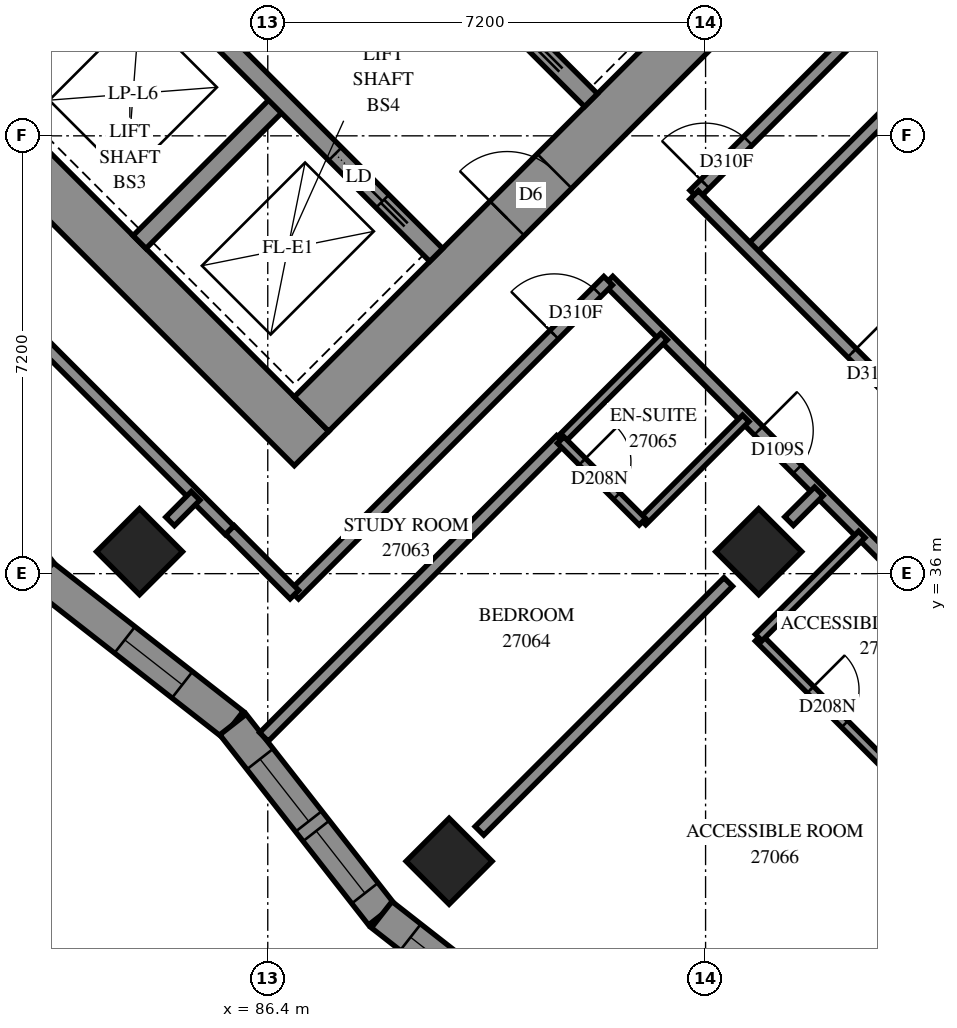
"""IFC4 building model, lengths in metres.
Left out: names, types, materials, properties, quantities, classifications, styles, units other than length and angle.
Written with IfcOpenShell. Run it as: python <this file> out.ifc"""

import sys

from ifc_helpers import new_model, si_unit, direction, frame, frame_2d, origin, origin_2d, place, context, subcontext, project, spatial, polyline, rectangle, outline, extrude, element, fill, save


model = new_model("IFC4")
c1 = context("Model", 3, precision=1e-05, world=origin(), true_north=direction((0.0, 1.0)))
c2 = subcontext(c1, "Body", "Model", "MODEL_VIEW")
j1 = project(units=[si_unit("LENGTHUNIT", "METRE"), si_unit("PLANEANGLEUNIT", "RADIAN")], contexts=[c1])
p1 = place(None, origin())
s1 = spatial("IfcSite", under=j1, at=p1, CompositionType="ELEMENT")
p2 = place(p1, origin())
s2 = spatial("IfcBuilding", under=s1, at=p2, CompositionType="ELEMENT")
p3 = place(p2, frame((0.0, 0.0, 101.6)))
s3 = spatial("IfcBuildingStorey", under=s2, at=p3, CompositionType="ELEMENT", Elevation=101.6)
for number, where, z_axis, x_axis in (
    (1, (84.291, 36.362, 0.0), (0.0, 0.0, 1.0), (0.707, -0.707, 0.0)),
    (2, (94.474, 36.362, 0.0), (0.0, 0.0, 1.0), (0.707, -0.707, 0.0)),
    (3, (89.382, 31.271, 0.0), (0.0, 0.0, 1.0), (0.707, -0.707, 0.0)),
):
    element("IfcColumn", number, at=place(p3, frame(where, z_axis=z_axis, x_axis=x_axis)), inside=s3, PredefinedType="COLUMN", context=c2, shape_type="SweptSolid", body=[
        extrude(rectangle(XDim=1.0, YDim=1.0, at=origin_2d()), origin(), (0.0, 0.0, 1.0), 3.1),
    ])
p4 = place(p3, frame((75.806, 49.373, -0.3), z_axis=(0.0, 0.0, 1.0), x_axis=(0.7071067812, -0.7071067812, 0.0)))
e4 = element("IfcWall", 4, at=p4, inside=s3, PredefinedType="SHEAR", context=c2, shape_type="SweptSolid", body=[
    extrude(rectangle(XDim=16.0, YDim=0.8, at=frame_2d((8.0, 0.0))), origin(), (0.0, 0.0, 1.0), 2.7),
])
p5 = place(p3, frame((87.12, 38.625, -0.3), z_axis=(0.0, 0.0, 1.0), x_axis=(0.7071067812, 0.7071067812, 0.0)))
e5 = element("IfcWall", 5, at=p5, inside=s3, PredefinedType="SHEAR", context=c2, shape_type="SweptSolid", body=[
    extrude(rectangle(XDim=14.4, YDim=0.8, at=frame_2d((7.2, 0.0))), origin(), (0.0, 0.0, 1.0), 2.7),
])
p6 = place(p5, frame((4.55, 0.0, 0.3)))
e6 = element("IfcOpeningElement", 6, at=p6, cuts=e5, PredefinedType="OPENING", context=c2, shape_type="SweptSolid", body=[
    extrude(rectangle(XDim=1.1, YDim=2.1, at=frame_2d((0.55, 1.05))), frame((0.0, 0.41, 0.0), z_axis=(0.0, -1.0, 0.0), x_axis=(1.0, 0.0, 0.0)), (0.0, 0.0, 1.0), 0.82),
])
p7 = place(p5, frame((11.35, 0.0, 0.3)))
e7 = element("IfcOpeningElement", 7, at=p7, cuts=e5, PredefinedType="OPENING", context=c2, shape_type="SweptSolid", body=[
    extrude(rectangle(XDim=1.1, YDim=2.1, at=frame_2d((0.55, 1.05))), frame((0.0, 0.41, 0.0), z_axis=(0.0, -1.0, 0.0), x_axis=(1.0, 0.0, 0.0)), (0.0, 0.0, 1.0), 0.82),
])
for number, where, z_axis, x_axis in (
    (8, (81.746, 43.999, 0.0), (0.0, 0.0, 1.0), (0.707, 0.707, 0.0)),
    (9, (84.291, 41.453, 0.0), (0.0, 0.0, 1.0), (0.707, 0.707, 0.0)),
):
    element("IfcWall", number, at=place(p3, frame(where, z_axis=z_axis, x_axis=x_axis)), inside=s3, PredefinedType="SOLIDWALL", context=c2, shape_type="SweptSolid", body=[
        extrude(rectangle(XDim=3.3, YDim=0.3, at=frame_2d((1.65, 0.0))), origin(), (0.0, 0.0, 1.0), 3.1),
    ])
p8 = place(p3, frame((78.988, 51.423, 0.0), z_axis=(0.0, 0.0, 1.0), x_axis=(0.7071067812, -0.7071067812, 0.0)))
e10 = element("IfcWall", 10, at=p8, inside=s3, PredefinedType="SOLIDWALL", context=c2, shape_type="SweptSolid", body=[
    extrude(rectangle(XDim=14.4, YDim=0.3, at=frame_2d((7.2, 0.0))), origin(), (0.0, 0.0, 1.0), 3.1),
])
p9 = place(p8, frame((1.25, 0.0, 0.0)))
e11 = element("IfcOpeningElement", 11, at=p9, cuts=e10, PredefinedType="OPENING", context=c2, shape_type="SweptSolid", body=[
    extrude(rectangle(XDim=1.1, YDim=2.1, at=frame_2d((0.55, 1.05))), frame((0.0, 0.16, 0.0), z_axis=(0.0, -1.0, 0.0), x_axis=(1.0, 0.0, 0.0)), (0.0, 0.0, 1.0), 0.32),
])
p10 = place(p8, frame((4.85, 0.0, 0.0)))
e12 = element("IfcOpeningElement", 12, at=p10, cuts=e10, PredefinedType="OPENING", context=c2, shape_type="SweptSolid", body=[
    extrude(rectangle(XDim=1.1, YDim=2.1, at=frame_2d((0.55, 1.05))), frame((0.0, 0.16, 0.0), z_axis=(0.0, -1.0, 0.0), x_axis=(1.0, 0.0, 0.0)), (0.0, 0.0, 1.0), 0.32),
])
p11 = place(p8, frame((8.45, 0.0, 0.0)))
e13 = element("IfcOpeningElement", 13, at=p11, cuts=e10, PredefinedType="OPENING", context=c2, shape_type="SweptSolid", body=[
    extrude(rectangle(XDim=1.1, YDim=2.1, at=frame_2d((0.55, 1.05))), frame((0.0, 0.16, 0.0), z_axis=(0.0, -1.0, 0.0), x_axis=(1.0, 0.0, 0.0)), (0.0, 0.0, 1.0), 0.32),
])
p12 = place(p8, frame((12.05, 0.0, 0.0)))
e14 = element("IfcOpeningElement", 14, at=p12, cuts=e10, PredefinedType="OPENING", context=c2, shape_type="SweptSolid", body=[
    extrude(rectangle(XDim=1.1, YDim=2.1, at=frame_2d((0.55, 1.05))), frame((0.0, 0.16, 0.0), z_axis=(0.0, -1.0, 0.0), x_axis=(1.0, 0.0, 0.0)), (0.0, 0.0, 1.0), 0.32),
])
p13 = place(p3, frame((81.534, 53.969, 0.0), z_axis=(0.0, 0.0, 1.0), x_axis=(0.707103309, -0.7071102534, 0.0)))
e15 = element("IfcWall", 15, at=p13, inside=s3, PredefinedType="SOLIDWALL", context=c2, shape_type="SweptSolid", body=[
    extrude(rectangle(XDim=14.4, YDim=0.3, at=frame_2d((7.2, 0.0))), origin(), (0.0, 0.0, 1.0), 3.1),
])
p14 = place(p13, frame((12.05, 0.0, 0.0)))
e16 = element("IfcOpeningElement", 16, at=p14, cuts=e15, PredefinedType="OPENING", context=c2, shape_type="SweptSolid", body=[
    extrude(rectangle(XDim=1.1, YDim=2.1, at=frame_2d((0.55, 1.05))), frame((0.0, 0.16, 0.0), z_axis=(0.0, -1.0, 0.0), x_axis=(1.0, 0.0, 0.0)), (0.0, 0.0, 1.0), 0.32),
])
p15 = place(p3, frame((80.243, 39.109, 0.0), z_axis=(0.0, 0.0, 1.0), x_axis=(0.6160271492, -0.7877249212, 0.0)))
e17 = element("IfcWall", 17, at=p15, inside=s3, PredefinedType="SOLIDWALL", context=c2, shape_type="SweptSolid", body=[
    extrude(outline(polyline([(0.054, -0.275), (4.024, -0.275), (3.957, 0.275), (-0.054, 0.275), (0.054, -0.275)])), origin(), (0.0, 0.0, 1.0), 3.1),
])
p16 = place(p15, frame((1.886, 0.0, 0.5)))
e18 = element("IfcOpeningElement", 18, at=p16, cuts=e17, PredefinedType="OPENING", context=c2, shape_type="SweptSolid", body=[
    extrude(rectangle(XDim=1.2, YDim=2.45, at=frame_2d((0.6, 1.225))), frame((0.0, 0.285, 0.0), z_axis=(0.0, -1.0, 0.0), x_axis=(1.0, 0.0, 0.0)), (0.0, 0.0, 1.0), 0.57),
])
p17 = place(p3, frame((82.701, 35.965, 0.0), z_axis=(0.0, 0.0, 1.0), x_axis=(0.7877313819, -0.6160188877, 0.0)))
e19 = element("IfcWall", 19, at=p17, inside=s3, PredefinedType="SOLIDWALL", context=c2, shape_type="SweptSolid", body=[
    extrude(outline(polyline([(-0.034, -0.275), (3.936, -0.275), (4.004, 0.275), (0.034, 0.275), (-0.034, -0.275)])), origin(), (0.0, 0.0, 1.0), 3.1),
])
p18 = place(p17, frame((1.71, 0.0, 0.5)))
e20 = element("IfcOpeningElement", 20, at=p18, cuts=e19, PredefinedType="OPENING", context=c2, shape_type="SweptSolid", body=[
    extrude(rectangle(XDim=1.2, YDim=2.45, at=frame_2d((0.6, 1.225))), frame((0.0, 0.285, 0.0), z_axis=(0.0, -1.0, 0.0), x_axis=(1.0, 0.0, 0.0)), (0.0, 0.0, 1.0), 0.57),
])
p19 = place(p3, frame((85.828, 33.52, 0.0), z_axis=(0.0, 0.0, 1.0), x_axis=(0.6160188877, -0.7877313819, 0.0)))
e21 = element("IfcWall", 21, at=p19, inside=s3, PredefinedType="SOLIDWALL", context=c2, shape_type="SweptSolid", body=[
    extrude(outline(polyline([(0.034, -0.275), (4.004, -0.275), (3.936, 0.275), (-0.034, 0.275), (0.034, -0.275)])), origin(), (0.0, 0.0, 1.0), 3.1),
])
p20 = place(p19, frame((0.722, 0.0, 0.5)))
e22 = element("IfcOpeningElement", 22, at=p20, cuts=e21, PredefinedType="OPENING", context=c2, shape_type="SweptSolid", body=[
    extrude(rectangle(XDim=1.3, YDim=2.45, at=frame_2d((0.65, 1.225))), frame((0.0, 0.285, 0.0), z_axis=(0.0, -1.0, 0.0), x_axis=(1.0, 0.0, 0.0)), (0.0, 0.0, 1.0), 0.57),
])
p21 = place(p19, frame((2.222, 0.0, 0.5)))
e23 = element("IfcOpeningElement", 23, at=p21, cuts=e21, PredefinedType="OPENING", context=c2, shape_type="SweptSolid", body=[
    extrude(rectangle(XDim=1.3, YDim=2.45, at=frame_2d((0.65, 1.225))), frame((0.0, 0.285, 0.0), z_axis=(0.0, -1.0, 0.0), x_axis=(1.0, 0.0, 0.0)), (0.0, 0.0, 1.0), 0.57),
])
p22 = place(p3, frame((88.274, 30.392, 0.0), z_axis=(0.0, 0.0, 1.0), x_axis=(0.7877191588, -0.6160345176, 0.0)))
e24 = element("IfcWall", 24, at=p22, inside=s3, PredefinedType="SOLIDWALL", context=c2, shape_type="SweptSolid", body=[
    extrude(outline(polyline([(-0.034, -0.275), (3.936, -0.275), (4.004, 0.275), (0.034, 0.275), (-0.034, -0.275)])), origin(), (0.0, 0.0, 1.0), 3.1),
])
p23 = place(p22, frame((0.602, 0.0, 0.5)))
e25 = element("IfcOpeningElement", 25, at=p23, cuts=e24, PredefinedType="OPENING", context=c2, shape_type="SweptSolid", body=[
    extrude(rectangle(XDim=1.3, YDim=2.45, at=frame_2d((0.65, 1.225))), frame((0.0, 0.285, 0.0), z_axis=(0.0, -1.0, 0.0), x_axis=(1.0, 0.0, 0.0)), (0.0, 0.0, 1.0), 0.57),
])
p24 = place(p22, frame((2.102, 0.0, 0.5)))
e26 = element("IfcOpeningElement", 26, at=p24, cuts=e24, PredefinedType="OPENING", context=c2, shape_type="SweptSolid", body=[
    extrude(rectangle(XDim=1.3, YDim=2.45, at=frame_2d((0.65, 1.225))), frame((0.0, 0.285, 0.0), z_axis=(0.0, -1.0, 0.0), x_axis=(1.0, 0.0, 0.0)), (0.0, 0.0, 1.0), 0.57),
])
p25 = place(p3, frame((92.004, 40.819, 0.0), z_axis=(0.0, 0.0, 1.0), x_axis=(0.7071067812, -0.7071067812, 0.0)))
e27 = element("IfcWall", 27, at=p25, inside=s3, PredefinedType="PARTITIONING", context=c2, shape_type="SweptSolid", body=[
    extrude(rectangle(XDim=19.298, YDim=0.2, at=frame_2d((9.649, 0.0))), origin(), (0.0, 0.0, 1.0), 3.1),
])
p26 = place(p25, frame((3.489, 0.0, 0.0)))
e28 = element("IfcOpeningElement", 28, at=p26, cuts=e27, PredefinedType="OPENING", context=c2, shape_type="SweptSolid", body=[
    extrude(rectangle(XDim=0.9, YDim=2.1, at=frame_2d((0.45, 1.05))), frame((0.0, 0.11, 0.0), z_axis=(0.0, -1.0, 0.0), x_axis=(1.0, 0.0, 0.0)), (0.0, 0.0, 1.0), 0.22),
])
p27 = place(p25, frame((9.319, 0.0, 0.0)))
e29 = element("IfcOpeningElement", 29, at=p27, cuts=e27, PredefinedType="OPENING", context=c2, shape_type="SweptSolid", body=[
    extrude(rectangle(XDim=0.9, YDim=2.1, at=frame_2d((0.45, 1.05))), frame((0.0, 0.11, 0.0), z_axis=(0.0, -1.0, 0.0), x_axis=(1.0, 0.0, 0.0)), (0.0, 0.0, 1.0), 0.22),
])
p28 = place(p25, frame((15.961, 0.0, 0.0)))
e30 = element("IfcOpeningElement", 30, at=p28, cuts=e27, PredefinedType="OPENING", context=c2, shape_type="SweptSolid", body=[
    extrude(rectangle(XDim=0.9, YDim=2.1, at=frame_2d((0.45, 1.05))), frame((0.0, 0.11, 0.0), z_axis=(0.0, -1.0, 0.0), x_axis=(1.0, 0.0, 0.0)), (0.0, 0.0, 1.0), 0.22),
])
p29 = place(p3, frame((94.331, 41.313, 0.0), z_axis=(0.0, 0.0, 1.0), x_axis=(0.7071109413, 0.7071026211, 0.0)))
e31 = element("IfcWall", 31, at=p29, inside=s3, PredefinedType="PARTITIONING", context=c2, shape_type="SweptSolid", body=[
    extrude(rectangle(XDim=12.019, YDim=0.2, at=frame_2d((6.01, 0.0))), origin(), (0.0, 0.0, 1.0), 3.1),
])
p30 = place(p3, frame((93.413, 42.233, 0.0), z_axis=(0.0, 0.0, 1.0), x_axis=(0.7071067812, 0.7071067812, 0.0)))
e32 = element("IfcWall", 32, at=p30, inside=s3, PredefinedType="PARTITIONING", context=c2, shape_type="SweptSolid", body=[
    extrude(rectangle(XDim=9.699, YDim=0.2, at=frame_2d((4.849, 0.0))), origin(), (0.0, 0.0, 1.0), 3.1),
])
p31 = place(p30, frame((0.249, 0.0, 0.0)))
e33 = element("IfcOpeningElement", 33, at=p31, cuts=e32, PredefinedType="OPENING", context=c2, shape_type="SweptSolid", body=[
    extrude(rectangle(XDim=1.0, YDim=2.1, at=frame_2d((0.5, 1.05))), frame((0.0, 0.11, 0.0), z_axis=(0.0, -1.0, 0.0), x_axis=(1.0, 0.0, 0.0)), (0.0, 0.0, 1.0), 0.22),
])
p32 = place(p3, frame((93.411, 42.227, 0.0), z_axis=(0.0, 0.0, 1.0), x_axis=(0.7071067812, -0.7071067812, 0.0)))
e34 = element("IfcWall", 34, at=p32, inside=s3, PredefinedType="PARTITIONING", context=c2, shape_type="SweptSolid", body=[
    extrude(rectangle(XDim=8.499, YDim=0.2, at=frame_2d((4.25, 0.0))), origin(), (0.0, 0.0, 1.0), 3.1),
])
p33 = place(p32, frame((3.672, 0.0, 0.0)))
e35 = element("IfcOpeningElement", 35, at=p33, cuts=e34, PredefinedType="OPENING", context=c2, shape_type="SweptSolid", body=[
    extrude(rectangle(XDim=1.0, YDim=2.1, at=frame_2d((0.5, 1.05))), frame((0.0, 0.11, 0.0), z_axis=(0.0, -1.0, 0.0), x_axis=(1.0, 0.0, 0.0)), (0.0, 0.0, 1.0), 0.22),
])
p34 = place(p3, frame((86.835, 35.655, 0.0), z_axis=(0.0, 0.0, 1.0), x_axis=(0.7071067812, 0.7071067812, 0.0)))
e36 = element("IfcWall", 36, at=p34, inside=s3, PredefinedType="PARTITIONING", context=c2, shape_type="SweptSolid", body=[
    extrude(rectangle(XDim=7.3, YDim=0.2, at=frame_2d((3.65, 0.0))), origin(), (0.0, 0.0, 1.0), 3.1),
])
p35 = place(p34, frame((6.046, 0.0, 0.0)))
e37 = element("IfcOpeningElement", 37, at=p35, cuts=e36, PredefinedType="OPENING", context=c2, shape_type="SweptSolid", body=[
    extrude(rectangle(XDim=1.0, YDim=2.1, at=frame_2d((0.5, 1.05))), frame((0.0, 0.11, 0.0), z_axis=(0.0, -1.0, 0.0), x_axis=(1.0, 0.0, 0.0)), (0.0, 0.0, 1.0), 0.22),
])
p36 = place(p3, frame((86.337, 33.315, 0.0), z_axis=(0.0, 0.0, 1.0), x_axis=(0.7069692223, 0.7072443133, 0.0)))
e38 = element("IfcWall", 38, at=p36, inside=s3, PredefinedType="PARTITIONING", context=c2, shape_type="SweptSolid", body=[
    extrude(rectangle(XDim=6.907, YDim=0.2, at=frame_2d((3.453, 0.0))), origin(), (0.0, 0.0, 1.0), 3.1),
])
p37 = place(p3, frame((80.948, 41.536, 0.0), z_axis=(0.0, 0.0, 1.0), x_axis=(0.7071067812, -0.7071067812, 0.0)))
e39 = element("IfcWall", 39, at=p37, inside=s3, PredefinedType="PARTITIONING", context=c2, shape_type="SweptSolid", body=[
    extrude(rectangle(XDim=6.822, YDim=0.2, at=frame_2d((3.411, 0.0))), origin(), (0.0, 0.0, 1.0), 3.1),
])
p38 = place(p3, frame((89.881, 31.771, 0.0), z_axis=(0.0, 0.0, 1.0), x_axis=(0.7071067812, 0.7071067812, 0.0)))
e40 = element("IfcWall", 40, at=p38, inside=s3, PredefinedType="PARTITIONING", context=c2, shape_type="SweptSolid", body=[
    extrude(rectangle(XDim=5.787, YDim=0.2, at=frame_2d((2.893, 0.0))), origin(), (0.0, 0.0, 1.0), 3.1),
])
p39 = place(p3, frame((94.973, 26.681, 0.0), z_axis=(0.0, 0.0, 1.0), x_axis=(0.7071067812, 0.7071067812, 0.0)))
e41 = element("IfcWall", 41, at=p39, inside=s3, PredefinedType="PARTITIONING", context=c2, shape_type="SweptSolid", body=[
    extrude(rectangle(XDim=5.784, YDim=0.2, at=frame_2d((2.892, 0.0))), origin(), (0.0, 0.0, 1.0), 3.1),
])
p40 = place(p3, frame((94.471, 34.945, 0.0), z_axis=(0.0, 0.0, 1.0), x_axis=(0.7067942478, -0.7074191764, 0.0)))
e42 = element("IfcWall", 42, at=p40, inside=s3, PredefinedType="PARTITIONING", context=c2, shape_type="SweptSolid", body=[
    extrude(rectangle(XDim=3.2, YDim=0.15, at=frame_2d((1.6, 0.0))), origin(), (0.0, 0.0, 1.0), 3.1),
])
p41 = place(p40, frame((1.206, 0.0, 0.0)))
e43 = element("IfcOpeningElement", 43, at=p41, cuts=e42, PredefinedType="OPENING", context=c2, shape_type="SweptSolid", body=[
    extrude(rectangle(XDim=0.8, YDim=2.1, at=frame_2d((0.4, 1.05))), frame((0.0, 0.085, 0.0), z_axis=(0.0, -1.0, 0.0), x_axis=(1.0, 0.0, 0.0)), (0.0, 0.0, 1.0), 0.17),
])
for number, where, z_axis, x_axis in (
    (44, (92.563, 36.857, 0.0), (0.0, 0.0, 1.0), (0.707, 0.707, 0.0)),
    (45, (91.219, 38.201, 0.0), (0.0, 0.0, 1.0), (0.707, 0.707, 0.0)),
):
    element("IfcWall", number, at=place(p3, frame(where, z_axis=z_axis, x_axis=x_axis)), inside=s3, PredefinedType="PARTITIONING", context=c2, shape_type="SweptSolid", body=[
        extrude(rectangle(XDim=2.401, YDim=0.15, at=frame_2d((1.201, 0.0))), origin(), (0.0, 0.0, 1.0), 3.1),
    ])
p42 = place(p3, frame((94.473, 34.949, 0.0), z_axis=(0.0, 0.0, 1.0), x_axis=(0.7071067812, 0.7071067812, 0.0)))
e46 = element("IfcWall", 46, at=p42, inside=s3, PredefinedType="PARTITIONING", context=c2, shape_type="SweptSolid", body=[
    extrude(rectangle(XDim=2.398, YDim=0.15, at=frame_2d((1.199, 0.0))), origin(), (0.0, 0.0, 1.0), 3.1),
])
p43 = place(p3, frame((91.217, 38.197, 0.0), z_axis=(0.0, 0.0, 1.0), x_axis=(0.7071067812, -0.7071067812, 0.0)))
e47 = element("IfcWall", 47, at=p43, inside=s3, PredefinedType="PARTITIONING", context=c2, shape_type="SweptSolid", body=[
    extrude(rectangle(XDim=1.901, YDim=0.15, at=frame_2d((0.95, 0.0))), origin(), (0.0, 0.0, 1.0), 3.1),
])
p44 = place(p43, frame((0.502, 0.0, 0.0)))
e48 = element("IfcOpeningElement", 48, at=p44, cuts=e47, PredefinedType="OPENING", context=c2, shape_type="SweptSolid", body=[
    extrude(rectangle(XDim=0.8, YDim=2.1, at=frame_2d((0.4, 1.05))), frame((0.0, 0.085, 0.0), z_axis=(0.0, -1.0, 0.0), x_axis=(1.0, 0.0, 0.0)), (0.0, 0.0, 1.0), 0.17),
])
p45 = place(p3, frame((85.778, 36.718, 0.0), z_axis=(0.0, 0.0, 1.0), x_axis=(0.7064400143, -0.70777292, 0.0)))
e49 = element("IfcWall", 49, at=p45, inside=s3, PredefinedType="PARTITIONING", context=c2, shape_type="SweptSolid", body=[
    extrude(rectangle(XDim=1.5, YDim=0.2, at=frame_2d((0.75, 0.0))), origin(), (0.0, 0.0, 1.0), 3.1),
])
p46 = place(p3, frame((94.973, 36.863, 0.0), z_axis=(0.0, 0.0, 1.0), x_axis=(0.7071067812, 0.7071067812, 0.0)))
e50 = element("IfcWall", 50, at=p46, inside=s3, PredefinedType="PARTITIONING", context=c2, shape_type="SweptSolid", body=[
    extrude(rectangle(XDim=0.693, YDim=0.2, at=frame_2d((0.346, 0.0))), origin(), (0.0, 0.0, 1.0), 3.1),
])
p47 = place(p3, frame((84.794, 36.86, 0.0), z_axis=(0.0, 0.0, 1.0), x_axis=(0.7054171665, 0.7087923682, 0.0)))
e51 = element("IfcWall", 51, at=p47, inside=s3, PredefinedType="PARTITIONING", context=c2, shape_type="SweptSolid", body=[
    extrude(rectangle(XDim=0.593, YDim=0.2, at=frame_2d((0.296, 0.0))), origin(), (0.0, 0.0, 1.0), 3.1),
])
p48 = place(p18, origin())
e52 = element("IfcWindow", 52, at=p48, inside=s3, PartitioningType="SINGLE_PANEL", PredefinedType="WINDOW", context=c2, shape_type="SweptSolid", body=[
    extrude(rectangle(XDim=1.2, YDim=2.45, at=frame_2d((0.6, 1.225))), frame((0.0, 0.155, 0.0), z_axis=(0.0, -1.0, 0.0), x_axis=(1.0, 0.0, 0.0)), (0.0, 0.0, 1.0), 0.06),
])
fill(e20, e52)
p49 = place(p20, origin())
e53 = element("IfcWindow", 53, at=p49, inside=s3, PartitioningType="SINGLE_PANEL", PredefinedType="WINDOW", context=c2, shape_type="SweptSolid", body=[
    extrude(rectangle(XDim=1.3, YDim=2.45, at=frame_2d((0.65, 1.225))), frame((0.0, 0.155, 0.0), z_axis=(0.0, -1.0, 0.0), x_axis=(1.0, 0.0, 0.0)), (0.0, 0.0, 1.0), 0.06),
])
fill(e22, e53)
p50 = place(p21, origin())
e54 = element("IfcWindow", 54, at=p50, inside=s3, PartitioningType="SINGLE_PANEL", PredefinedType="WINDOW", context=c2, shape_type="SweptSolid", body=[
    extrude(rectangle(XDim=1.3, YDim=2.45, at=frame_2d((0.65, 1.225))), frame((0.0, 0.155, 0.0), z_axis=(0.0, -1.0, 0.0), x_axis=(1.0, 0.0, 0.0)), (0.0, 0.0, 1.0), 0.06),
])
fill(e23, e54)
p51 = place(p23, origin())
e55 = element("IfcWindow", 55, at=p51, inside=s3, PartitioningType="SINGLE_PANEL", PredefinedType="WINDOW", context=c2, shape_type="SweptSolid", body=[
    extrude(rectangle(XDim=1.3, YDim=2.45, at=frame_2d((0.65, 1.225))), frame((0.0, 0.155, 0.0), z_axis=(0.0, -1.0, 0.0), x_axis=(1.0, 0.0, 0.0)), (0.0, 0.0, 1.0), 0.06),
])
fill(e25, e55)
p52 = place(p6, origin())
e56 = element("IfcDoor", 56, at=p52, inside=s3, OperationType="DOUBLE_DOOR_SINGLE_SWING", PredefinedType="DOOR", context=c2, shape_type="SweptSolid", body=[
    extrude(rectangle(XDim=1.1, YDim=2.1, at=frame_2d((0.55, 1.05))), frame((0.0, 0.025, 0.0), z_axis=(0.0, -1.0, 0.0), x_axis=(1.0, 0.0, 0.0)), (0.0, 0.0, 1.0), 0.05),
])
fill(e6, e56)
p53 = place(p12, origin())
e57 = element("IfcDoor", 57, at=p53, inside=s3, OperationType="SLIDING_TO_RIGHT", PredefinedType="DOOR", context=c2, shape_type="SweptSolid", body=[
    extrude(rectangle(XDim=1.1, YDim=2.1, at=frame_2d((0.55, 1.05))), frame((0.0, 0.025, 0.0), z_axis=(0.0, -1.0, 0.0), x_axis=(1.0, 0.0, 0.0)), (0.0, 0.0, 1.0), 0.05),
])
fill(e14, e57)
p54 = place(p31, origin())
e58 = element("IfcDoor", 58, at=p54, inside=s3, OperationType="SINGLE_SWING_LEFT", PredefinedType="DOOR", context=c2, shape_type="SweptSolid", body=[
    extrude(rectangle(XDim=1.0, YDim=2.1, at=frame_2d((0.5, 1.05))), frame((0.0, 0.025, 0.0), z_axis=(0.0, -1.0, 0.0), x_axis=(1.0, 0.0, 0.0)), (0.0, 0.0, 1.0), 0.05),
])
fill(e33, e58)
p55 = place(p33, origin())
e59 = element("IfcDoor", 59, at=p55, inside=s3, OperationType="SINGLE_SWING_RIGHT", PredefinedType="DOOR", context=c2, shape_type="SweptSolid", body=[
    extrude(rectangle(XDim=1.0, YDim=2.1, at=frame_2d((0.5, 1.05))), frame((0.0, 0.025, 0.0), z_axis=(0.0, -1.0, 0.0), x_axis=(1.0, 0.0, 0.0)), (0.0, 0.0, 1.0), 0.05),
])
fill(e35, e59)
p56 = place(p35, origin())
e60 = element("IfcDoor", 60, at=p56, inside=s3, OperationType="SINGLE_SWING_RIGHT", PredefinedType="DOOR", context=c2, shape_type="SweptSolid", body=[
    extrude(rectangle(XDim=1.0, YDim=2.1, at=frame_2d((0.5, 1.05))), frame((0.0, 0.025, 0.0), z_axis=(0.0, -1.0, 0.0), x_axis=(1.0, 0.0, 0.0)), (0.0, 0.0, 1.0), 0.05),
])
fill(e37, e60)
p57 = place(p26, origin())
e61 = element("IfcDoor", 61, at=p57, inside=s3, OperationType="SINGLE_SWING_LEFT", PredefinedType="DOOR", context=c2, shape_type="SweptSolid", body=[
    extrude(rectangle(XDim=0.9, YDim=2.1, at=frame_2d((0.45, 1.05))), frame((0.0, 0.025, 0.0), z_axis=(0.0, -1.0, 0.0), x_axis=(1.0, 0.0, 0.0)), (0.0, 0.0, 1.0), 0.05),
])
fill(e28, e61)
p58 = place(p44, origin())
e62 = element("IfcDoor", 62, at=p58, inside=s3, OperationType="SINGLE_SWING_RIGHT", PredefinedType="DOOR", context=c2, shape_type="SweptSolid", body=[
    extrude(rectangle(XDim=0.8, YDim=2.1, at=frame_2d((0.4, 1.05))), frame((0.0, 0.025, 0.0), z_axis=(0.0, -1.0, 0.0), x_axis=(1.0, 0.0, 0.0)), (0.0, 0.0, 1.0), 0.05),
])
fill(e48, e62)
p59 = place(p41, origin())
e63 = element("IfcDoor", 63, at=p59, inside=s3, OperationType="SINGLE_SWING_RIGHT", PredefinedType="DOOR", context=c2, shape_type="SweptSolid", body=[
    extrude(rectangle(XDim=0.8, YDim=2.1, at=frame_2d((0.4, 1.05))), frame((0.0, 0.025, 0.0), z_axis=(0.0, -1.0, 0.0), x_axis=(1.0, 0.0, 0.0)), (0.0, 0.0, 1.0), 0.05),
])
fill(e43, e63)
save(model, sys.argv[1])
